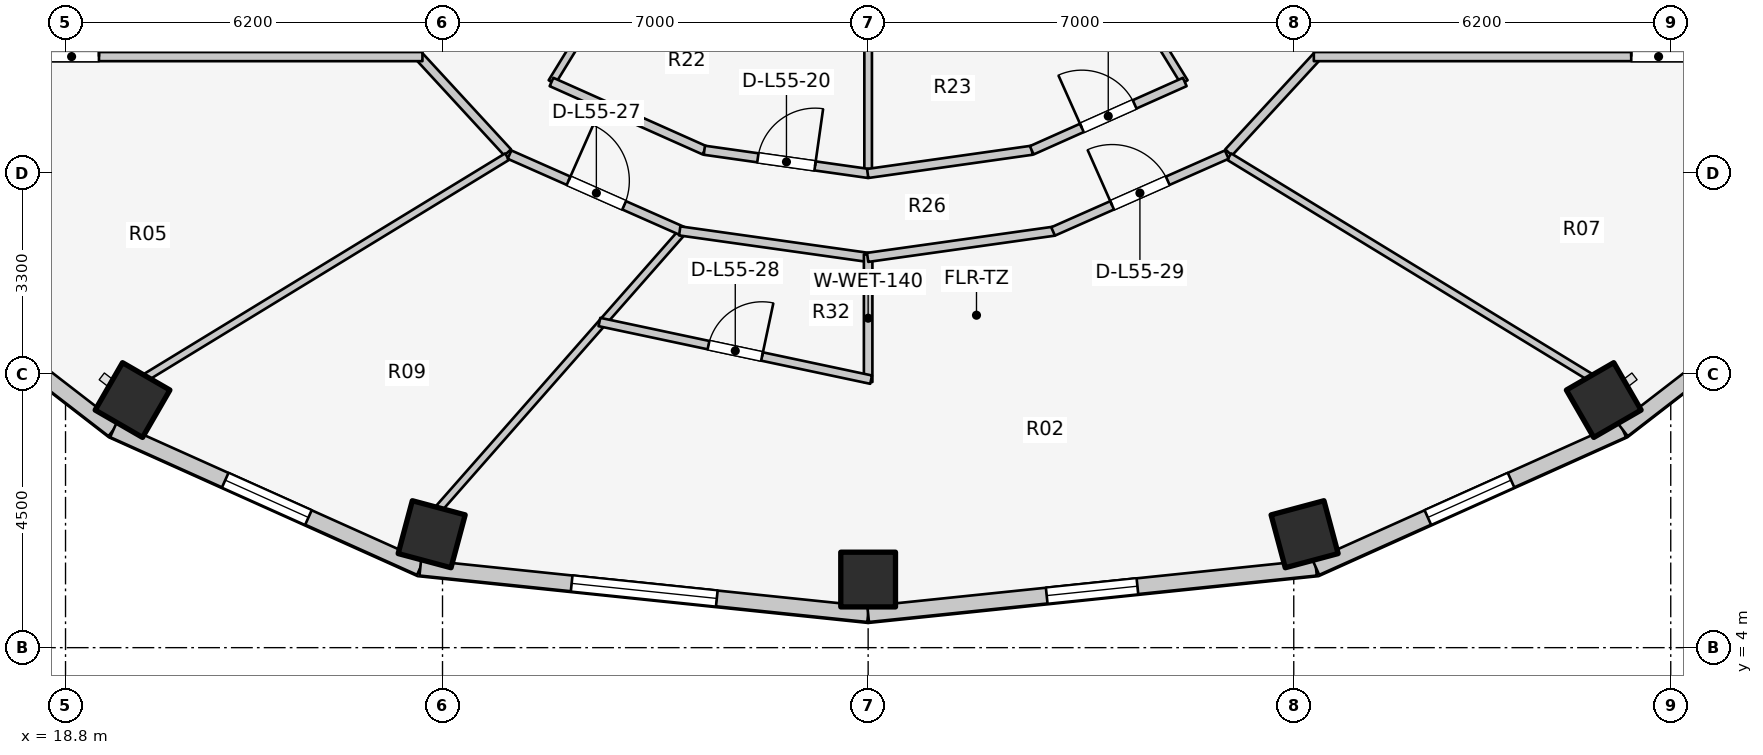
"""IFC4 building model, lengths in metres.
Left out: names, types, materials, properties, quantities, classifications, styles, units other than length and angle.
Written with IfcOpenShell. Run it as: python <this file> out.ifc"""

import sys

from ifc_helpers import new_model, si_unit, direction, frame, frame_2d, origin, origin_2d, place, context, subcontext, project, spatial, rectangle, extrude, element, fill, save


model = new_model("IFC4")
c1 = context("Model", 3, precision=1e-05, world=origin(), true_north=direction((0.0, 1.0)))
c2 = subcontext(c1, "Body", "Model", "MODEL_VIEW")
j1 = project(units=[si_unit("LENGTHUNIT", "METRE"), si_unit("PLANEANGLEUNIT", "RADIAN")], contexts=[c1])
p1 = place(None, origin())
s1 = spatial("IfcSite", under=j1, at=p1, CompositionType="ELEMENT")
p2 = place(p1, origin())
s2 = spatial("IfcBuilding", under=s1, at=p2, CompositionType="ELEMENT")
p3 = place(p2, frame((0.0, 0.0, 180.8)))
s3 = spatial("IfcBuildingStorey", under=s2, at=p3, CompositionType="ELEMENT", Elevation=180.8)
for number, where, z_axis, x_axis in (
    (1, (19.902, 8.072, 0.0), (0.0, 0.0, 1.0), (-0.5, -0.866, 0.0)),
    (2, (24.822, 5.865, 0.0), (0.0, 0.0, 1.0), (-0.259, -0.966, 0.0)),
    (3, (32.0, 5.12, 0.0), (0.0, 0.0, 1.0), (0.0, -1.0, 0.0)),
    (4, (39.178, 5.865, 0.0), (0.0, 0.0, 1.0), (0.259, -0.966, 0.0)),
    (5, (44.098, 8.072, 0.0), (0.0, 0.0, 1.0), (0.5, -0.866, 0.0)),
):
    element("IfcColumn", number, at=place(p3, frame(where, z_axis=z_axis, x_axis=x_axis)), inside=s3, PredefinedType="COLUMN", context=c2, shape_type="SweptSolid", body=[
        extrude(rectangle(XDim=0.9, YDim=0.9, at=origin_2d()), origin(), (0.0, 0.0, 1.0), 3.1),
    ])
p4 = place(p3, frame((15.731, 10.559, 0.0), z_axis=(0.0, 0.0, 1.0), x_axis=(0.791460185804, -0.611220724687, 0.0)))
e6 = element("IfcWall", 6, at=p4, inside=s3, PredefinedType="STANDARD", context=c2, shape_type="SweptSolid", body=[
    extrude(rectangle(XDim=4.872, YDim=0.26, at=frame_2d((2.436, 0.0))), origin(), (0.0, 0.0, 1.0), 2.85),
])
p5 = place(p3, frame((19.587, 7.581, 0.0), z_axis=(0.0, 0.0, 1.0), x_axis=(0.912353637112, -0.409403029847, 0.0)))
e7 = element("IfcWall", 7, at=p5, inside=s3, PredefinedType="STANDARD", context=c2, shape_type="SweptSolid", body=[
    extrude(rectangle(XDim=5.533, YDim=0.26, at=frame_2d((2.766, 0.0))), origin(), (0.0, 0.0, 1.0), 2.85),
])
p6 = place(p5, frame((2.016, 0.0, 0.75)))
e8 = element("IfcOpeningElement", 8, at=p6, cuts=e7, PredefinedType="OPENING", context=c2, shape_type="SweptSolid", body=[
    extrude(rectangle(XDim=1.5, YDim=1.6, at=frame_2d((0.75, 0.8))), frame((0.0, 0.14, 0.0), z_axis=(0.0, -1.0, 0.0), x_axis=(1.0, 0.0, 0.0)), (0.0, 0.0, 1.0), 0.28),
])
p7 = place(p3, frame((24.635, 5.315, 0.0), z_axis=(0.0, 0.0, 1.0), x_axis=(0.994664178965, -0.10316574569, 0.0)))
e9 = element("IfcWall", 9, at=p7, inside=s3, PredefinedType="STANDARD", context=c2, shape_type="SweptSolid", body=[
    extrude(rectangle(XDim=7.405, YDim=0.26, at=frame_2d((3.702, 0.0))), origin(), (0.0, 0.0, 1.0), 2.85),
])
p8 = place(p7, frame((2.502, 0.0, 0.75)))
e10 = element("IfcOpeningElement", 10, at=p8, cuts=e9, PredefinedType="OPENING", context=c2, shape_type="SweptSolid", body=[
    extrude(rectangle(XDim=2.4, YDim=1.7, at=frame_2d((1.2, 0.85))), frame((0.0, 0.14, 0.0), z_axis=(0.0, -1.0, 0.0), x_axis=(1.0, 0.0, 0.0)), (0.0, 0.0, 1.0), 0.28),
])
p9 = place(p3, frame((32.0, 4.552, 0.0), z_axis=(0.0, 0.0, 1.0), x_axis=(0.994664178965, 0.10316574569, 0.0)))
e11 = element("IfcWall", 11, at=p9, inside=s3, PredefinedType="STANDARD", context=c2, shape_type="SweptSolid", body=[
    extrude(rectangle(XDim=7.405, YDim=0.26, at=frame_2d((3.702, 0.0))), origin(), (0.0, 0.0, 1.0), 2.85),
])
p10 = place(p9, frame((2.952, 0.0, 0.75)))
e12 = element("IfcOpeningElement", 12, at=p10, cuts=e11, PredefinedType="OPENING", context=c2, shape_type="SweptSolid", body=[
    extrude(rectangle(XDim=1.5, YDim=1.6, at=frame_2d((0.75, 0.8))), frame((0.0, 0.14, 0.0), z_axis=(0.0, -1.0, 0.0), x_axis=(1.0, 0.0, 0.0)), (0.0, 0.0, 1.0), 0.28),
])
p11 = place(p3, frame((39.365, 5.315, 0.0), z_axis=(0.0, 0.0, 1.0), x_axis=(0.912353637112, 0.409403029847, 0.0)))
e13 = element("IfcWall", 13, at=p11, inside=s3, PredefinedType="STANDARD", context=c2, shape_type="SweptSolid", body=[
    extrude(rectangle(XDim=5.533, YDim=0.26, at=frame_2d((2.766, 0.0))), origin(), (0.0, 0.0, 1.0), 2.85),
])
p12 = place(p11, frame((2.016, 0.0, 0.75)))
e14 = element("IfcOpeningElement", 14, at=p12, cuts=e13, PredefinedType="OPENING", context=c2, shape_type="SweptSolid", body=[
    extrude(rectangle(XDim=1.5, YDim=1.6, at=frame_2d((0.75, 0.8))), frame((0.0, 0.14, 0.0), z_axis=(0.0, -1.0, 0.0), x_axis=(1.0, 0.0, 0.0)), (0.0, 0.0, 1.0), 0.28),
])
p13 = place(p3, frame((44.413, 7.581, 0.0), z_axis=(0.0, 0.0, 1.0), x_axis=(0.791460185804, 0.611220724687, 0.0)))
e15 = element("IfcWall", 15, at=p13, inside=s3, PredefinedType="STANDARD", context=c2, shape_type="SweptSolid", body=[
    extrude(rectangle(XDim=4.872, YDim=0.26, at=frame_2d((2.436, 0.0))), origin(), (0.0, 0.0, 1.0), 2.85),
])
p14 = place(p3, frame((26.072, 12.144, 0.0), z_axis=(0.0, 0.0, 1.0), x_axis=(-0.677579737957, 0.735449317567, 0.0)))
e16 = element("IfcWall", 16, at=p14, inside=s3, PredefinedType="PARTITIONING", context=c2, shape_type="SweptSolid", body=[
    extrude(rectangle(XDim=2.173, YDim=0.15, at=frame_2d((1.086, 0.0))), origin(), (0.0, 0.0, 1.0), 2.299),
])
p15 = place(p3, frame((17.15, 13.72, 0.0), z_axis=(0.0, 0.0, 1.0), x_axis=(1.0, 0.0, 0.0)))
e17 = element("IfcWall", 17, at=p15, inside=s3, PredefinedType="PARTITIONING", context=c2, shape_type="SweptSolid", body=[
    extrude(rectangle(XDim=7.52, YDim=0.15, at=frame_2d((3.76, 0.0))), origin(), (0.0, 0.0, 1.0), 2.299),
])
p16 = place(p15, frame((1.3, 0.0, 0.0)))
e18 = element("IfcOpeningElement", 18, at=p16, cuts=e17, PredefinedType="OPENING", context=c2, shape_type="SweptSolid", body=[
    extrude(rectangle(XDim=0.9, YDim=2.1, at=frame_2d((0.45, 1.05))), frame((0.0, 0.085, 0.0), z_axis=(0.0, -1.0, 0.0), x_axis=(1.0, 0.0, 0.0)), (0.0, 0.0, 1.0), 0.17),
])
p17 = place(p3, frame((37.928, 12.144, 0.0), z_axis=(0.0, 0.0, 1.0), x_axis=(0.677579737957, 0.735449317567, 0.0)))
e19 = element("IfcWall", 19, at=p17, inside=s3, PredefinedType="PARTITIONING", context=c2, shape_type="SweptSolid", body=[
    extrude(rectangle(XDim=2.173, YDim=0.15, at=frame_2d((1.086, 0.0))), origin(), (0.0, 0.0, 1.0), 2.299),
])
p18 = place(p3, frame((39.33, 13.72, 0.0), z_axis=(0.0, 0.0, 1.0), x_axis=(1.0, 0.0, 0.0)))
e20 = element("IfcWall", 20, at=p18, inside=s3, PredefinedType="PARTITIONING", context=c2, shape_type="SweptSolid", body=[
    extrude(rectangle(XDim=7.52, YDim=0.15, at=frame_2d((3.76, 0.0))), origin(), (0.0, 0.0, 1.0), 2.299),
])
p19 = place(p18, frame((5.22, 0.0, 0.0)))
e21 = element("IfcOpeningElement", 21, at=p19, cuts=e20, PredefinedType="OPENING", context=c2, shape_type="SweptSolid", body=[
    extrude(rectangle(XDim=0.9, YDim=2.1, at=frame_2d((0.45, 1.05))), frame((0.0, 0.085, 0.0), z_axis=(0.0, -1.0, 0.0), x_axis=(1.0, 0.0, 0.0)), (0.0, 0.0, 1.0), 0.17),
])
p20 = place(p3, frame((28.45, 15.985, 0.0), z_axis=(0.0, 0.0, 1.0), x_axis=(-0.523587550846, -0.851971875474, 0.0)))
e22 = element("IfcWall", 22, at=p20, inside=s3, PredefinedType="PARTITIONING", context=c2, shape_type="SweptSolid", body=[
    extrude(rectangle(XDim=3.153, YDim=0.125, at=frame_2d((1.577, 0.0))), origin(), (0.0, 0.0, 1.0), 2.299),
])
p21 = place(p3, frame((32.0, 14.9, 0.0), z_axis=(0.0, 0.0, 1.0), x_axis=(0.0, -1.0, 0.0)))
e23 = element("IfcWall", 23, at=p21, inside=s3, PredefinedType="PARTITIONING", context=c2, shape_type="SweptSolid", body=[
    extrude(rectangle(XDim=3.102, YDim=0.125, at=frame_2d((1.551, 0.0))), origin(), (0.0, 0.0, 1.0), 2.299),
])
p22 = place(p3, frame((35.55, 15.985, 0.0), z_axis=(0.0, 0.0, 1.0), x_axis=(0.523587550846, -0.851971875474, 0.0)))
e24 = element("IfcWall", 24, at=p22, inside=s3, PredefinedType="PARTITIONING", context=c2, shape_type="SweptSolid", body=[
    extrude(rectangle(XDim=3.153, YDim=0.125, at=frame_2d((1.577, 0.0))), origin(), (0.0, 0.0, 1.0), 2.299),
])
p23 = place(p3, frame((26.793, 13.303, 0.0), z_axis=(0.0, 0.0, 1.0), x_axis=(0.913145536541, -0.407633694749, 0.0)))
e25 = element("IfcWall", 25, at=p23, inside=s3, PredefinedType="PARTITIONING", context=c2, shape_type="SweptSolid", body=[
    extrude(rectangle(XDim=2.756, YDim=0.15, at=frame_2d((1.378, 0.0))), origin(), (0.0, 0.0, 1.0), 2.299),
])
p24 = place(p3, frame((29.306, 12.18, 0.0), z_axis=(0.0, 0.0, 1.0), x_axis=(0.990145400278, -0.140043158738, 0.0)))
e26 = element("IfcWall", 26, at=p24, inside=s3, PredefinedType="PARTITIONING", context=c2, shape_type="SweptSolid", body=[
    extrude(rectangle(XDim=2.728, YDim=0.15, at=frame_2d((1.364, 0.0))), origin(), (0.0, 0.0, 1.0), 2.299),
])
p25 = place(p24, frame((0.889, 0.0, 0.0)))
e27 = element("IfcOpeningElement", 27, at=p25, cuts=e26, PredefinedType="OPENING", context=c2, shape_type="SweptSolid", body=[
    extrude(rectangle(XDim=0.95, YDim=2.1, at=frame_2d((0.475, 1.05))), frame((0.0, 0.085, 0.0), z_axis=(0.0, -1.0, 0.0), x_axis=(1.0, 0.0, 0.0)), (0.0, 0.0, 1.0), 0.17),
])
p26 = place(p3, frame((31.993, 11.798, 0.0), z_axis=(0.0, 0.0, 1.0), x_axis=(0.990145400278, 0.140043158738, 0.0)))
e28 = element("IfcWall", 28, at=p26, inside=s3, PredefinedType="PARTITIONING", context=c2, shape_type="SweptSolid", body=[
    extrude(rectangle(XDim=2.728, YDim=0.15, at=frame_2d((1.364, 0.0))), origin(), (0.0, 0.0, 1.0), 2.299),
])
p27 = place(p3, frame((34.69, 12.179, 0.0), z_axis=(0.0, 0.0, 1.0), x_axis=(0.913145536541, 0.407633694749, 0.0)))
e29 = element("IfcWall", 29, at=p27, inside=s3, PredefinedType="PARTITIONING", context=c2, shape_type="SweptSolid", body=[
    extrude(rectangle(XDim=2.756, YDim=0.15, at=frame_2d((1.378, 0.0))), origin(), (0.0, 0.0, 1.0), 2.299),
])
p28 = place(p27, frame((0.903, 0.0, 0.0)))
e30 = element("IfcOpeningElement", 30, at=p28, cuts=e29, PredefinedType="OPENING", context=c2, shape_type="SweptSolid", body=[
    extrude(rectangle(XDim=0.95, YDim=2.1, at=frame_2d((0.475, 1.05))), frame((0.0, 0.085, 0.0), z_axis=(0.0, -1.0, 0.0), x_axis=(1.0, 0.0, 0.0)), (0.0, 0.0, 1.0), 0.17),
])
p29 = place(p3, frame((26.062, 12.075, 0.0), z_axis=(0.0, 0.0, 1.0), x_axis=(-0.853440334679, -0.521190555501, 0.0)))
e31 = element("IfcWall", 31, at=p29, inside=s3, PredefinedType="PARTITIONING", context=c2, shape_type="SweptSolid", body=[
    extrude(rectangle(XDim=6.966, YDim=0.125, at=frame_2d((3.483, 0.0))), origin(), (0.0, 0.0, 1.0), 2.299),
])
p30 = place(p3, frame((28.914, 10.805, 0.0), z_axis=(0.0, 0.0, 1.0), x_axis=(-0.660581320981, -0.750754499401, 0.0)))
e32 = element("IfcWall", 32, at=p30, inside=s3, PredefinedType="PARTITIONING", context=c2, shape_type="SweptSolid", body=[
    extrude(rectangle(XDim=6.027, YDim=0.125, at=frame_2d((3.013, 0.0))), origin(), (0.0, 0.0, 1.0), 2.299),
])
p31 = place(p3, frame((37.938, 12.075, 0.0), z_axis=(0.0, 0.0, 1.0), x_axis=(0.853440334679, -0.521190555501, 0.0)))
e33 = element("IfcWall", 33, at=p31, inside=s3, PredefinedType="PARTITIONING", context=c2, shape_type="SweptSolid", body=[
    extrude(rectangle(XDim=6.966, YDim=0.125, at=frame_2d((3.483, 0.0))), origin(), (0.0, 0.0, 1.0), 2.299),
])
p32 = place(p3, frame((26.102, 12.108, 0.0), z_axis=(0.0, 0.0, 1.0), x_axis=(0.914519212393, -0.40454247016, 0.0)))
e34 = element("IfcWall", 34, at=p32, inside=s3, PredefinedType="PARTITIONING", context=c2, shape_type="SweptSolid", body=[
    extrude(rectangle(XDim=3.124, YDim=0.15, at=frame_2d((1.562, 0.0))), origin(), (0.0, 0.0, 1.0), 2.299),
])
p33 = place(p32, frame((1.062, 0.0, 0.0)))
e35 = element("IfcOpeningElement", 35, at=p33, cuts=e34, PredefinedType="OPENING", context=c2, shape_type="SweptSolid", body=[
    extrude(rectangle(XDim=1.0, YDim=2.1, at=frame_2d((0.5, 1.05))), frame((0.0, 0.085, 0.0), z_axis=(0.0, -1.0, 0.0), x_axis=(1.0, 0.0, 0.0)), (0.0, 0.0, 1.0), 0.17),
])
p34 = place(p3, frame((28.901, 10.854, 0.0), z_axis=(0.0, 0.0, 1.0), x_axis=(0.990251283702, -0.139292480508, 0.0)))
e36 = element("IfcWall", 36, at=p34, inside=s3, PredefinedType="PARTITIONING", context=c2, shape_type="SweptSolid", body=[
    extrude(rectangle(XDim=3.179, YDim=0.15, at=frame_2d((1.59, 0.0))), origin(), (0.0, 0.0, 1.0), 2.299),
])
p35 = place(p3, frame((32.0, 10.468, 0.0), z_axis=(0.0, 0.0, 1.0), x_axis=(0.0, -1.0, 0.0)))
e37 = element("IfcWall", 37, at=p35, inside=s3, PredefinedType="PLUMBINGWALL", context=c2, shape_type="SweptSolid", body=[
    extrude(rectangle(XDim=2.1, YDim=0.14, at=frame_2d((1.05, 0.0))), origin(), (0.0, 0.0, 1.0), 2.299),
])
p36 = place(p3, frame((27.581, 9.356, 0.0), z_axis=(0.0, 0.0, 1.0), x_axis=(0.978225905005, -0.20754295646, 0.0)))
e38 = element("IfcWall", 38, at=p36, inside=s3, PredefinedType="PLUMBINGWALL", context=c2, shape_type="SweptSolid", body=[
    extrude(rectangle(XDim=4.568, YDim=0.14, at=frame_2d((2.284, 0.0))), origin(), (0.0, 0.0, 1.0), 2.299),
])
p37 = place(p36, frame((1.834, 0.0, 0.0)))
e39 = element("IfcOpeningElement", 39, at=p37, cuts=e38, PredefinedType="OPENING", context=c2, shape_type="SweptSolid", body=[
    extrude(rectangle(XDim=0.9, YDim=2.1, at=frame_2d((0.45, 1.05))), frame((0.0, 0.08, 0.0), z_axis=(0.0, -1.0, 0.0), x_axis=(1.0, 0.0, 0.0)), (0.0, 0.0, 1.0), 0.16),
])
p38 = place(p3, frame((31.992, 10.418, 0.0), z_axis=(0.0, 0.0, 1.0), x_axis=(0.990254709652, 0.13926812274, 0.0)))
e40 = element("IfcWall", 40, at=p38, inside=s3, PredefinedType="PARTITIONING", context=c2, shape_type="SweptSolid", body=[
    extrude(rectangle(XDim=3.096, YDim=0.15, at=frame_2d((1.548, 0.0))), origin(), (0.0, 0.0, 1.0), 2.299),
])
p39 = place(p3, frame((35.042, 10.844, 0.0), z_axis=(0.0, 0.0, 1.0), x_axis=(0.914519212393, 0.40454247016, 0.0)))
e41 = element("IfcWall", 41, at=p39, inside=s3, PredefinedType="PARTITIONING", context=c2, shape_type="SweptSolid", body=[
    extrude(rectangle(XDim=3.124, YDim=0.15, at=frame_2d((1.562, 0.0))), origin(), (0.0, 0.0, 1.0), 2.299),
])
p40 = place(p39, frame((1.062, 0.0, 0.0)))
e42 = element("IfcOpeningElement", 42, at=p40, cuts=e41, PredefinedType="OPENING", context=c2, shape_type="SweptSolid", body=[
    extrude(rectangle(XDim=1.0, YDim=2.1, at=frame_2d((0.5, 1.05))), frame((0.0, 0.085, 0.0), z_axis=(0.0, -1.0, 0.0), x_axis=(1.0, 0.0, 0.0)), (0.0, 0.0, 1.0), 0.17),
])
p41 = place(p6, origin())
e43 = element("IfcWindow", 43, at=p41, inside=s3, PartitioningType="SINGLE_PANEL", PredefinedType="WINDOW", context=c2, shape_type="SweptSolid", body=[
    extrude(rectangle(XDim=1.5, YDim=1.6, at=frame_2d((0.75, 0.8))), frame((0.0, 0.03, 0.0), z_axis=(0.0, -1.0, 0.0), x_axis=(1.0, 0.0, 0.0)), (0.0, 0.0, 1.0), 0.06),
])
fill(e8, e43)
p42 = place(p8, origin())
e44 = element("IfcWindow", 44, at=p42, inside=s3, PartitioningType="SINGLE_PANEL", PredefinedType="WINDOW", context=c2, shape_type="SweptSolid", body=[
    extrude(rectangle(XDim=2.4, YDim=1.7, at=frame_2d((1.2, 0.85))), frame((0.0, 0.03, 0.0), z_axis=(0.0, -1.0, 0.0), x_axis=(1.0, 0.0, 0.0)), (0.0, 0.0, 1.0), 0.06),
])
fill(e10, e44)
p43 = place(p10, origin())
e45 = element("IfcWindow", 45, at=p43, inside=s3, PartitioningType="SINGLE_PANEL", PredefinedType="WINDOW", context=c2, shape_type="SweptSolid", body=[
    extrude(rectangle(XDim=1.5, YDim=1.6, at=frame_2d((0.75, 0.8))), frame((0.0, 0.03, 0.0), z_axis=(0.0, -1.0, 0.0), x_axis=(1.0, 0.0, 0.0)), (0.0, 0.0, 1.0), 0.06),
])
fill(e12, e45)
p44 = place(p12, origin())
e46 = element("IfcWindow", 46, at=p44, inside=s3, PartitioningType="SINGLE_PANEL", PredefinedType="WINDOW", context=c2, shape_type="SweptSolid", body=[
    extrude(rectangle(XDim=1.5, YDim=1.6, at=frame_2d((0.75, 0.8))), frame((0.0, 0.03, 0.0), z_axis=(0.0, -1.0, 0.0), x_axis=(1.0, 0.0, 0.0)), (0.0, 0.0, 1.0), 0.06),
])
fill(e14, e46)
p45 = place(p16, origin())
e47 = element("IfcDoor", 47, at=p45, inside=s3, OperationType="SINGLE_SWING_RIGHT", PredefinedType="DOOR", context=c2, shape_type="SweptSolid", body=[
    extrude(rectangle(XDim=0.9, YDim=2.1, at=frame_2d((0.45, 1.05))), frame((0.0, 0.025, 0.0), z_axis=(0.0, -1.0, 0.0), x_axis=(1.0, 0.0, 0.0)), (0.0, 0.0, 1.0), 0.05),
])
fill(e18, e47)
p46 = place(p19, origin())
e48 = element("IfcDoor", 48, at=p46, inside=s3, OperationType="SINGLE_SWING_LEFT", PredefinedType="DOOR", context=c2, shape_type="SweptSolid", body=[
    extrude(rectangle(XDim=0.9, YDim=2.1, at=frame_2d((0.45, 1.05))), frame((0.0, 0.025, 0.0), z_axis=(0.0, -1.0, 0.0), x_axis=(1.0, 0.0, 0.0)), (0.0, 0.0, 1.0), 0.05),
])
fill(e21, e48)
p47 = place(p25, origin())
e49 = element("IfcDoor", 49, at=p47, inside=s3, OperationType="SINGLE_SWING_RIGHT", PredefinedType="DOOR", context=c2, shape_type="SweptSolid", body=[
    extrude(rectangle(XDim=0.95, YDim=2.1, at=frame_2d((0.475, 1.05))), frame((0.0, 0.025, 0.0), z_axis=(0.0, -1.0, 0.0), x_axis=(1.0, 0.0, 0.0)), (0.0, 0.0, 1.0), 0.05),
])
fill(e27, e49)
p48 = place(p28, origin())
e50 = element("IfcDoor", 50, at=p48, inside=s3, OperationType="SINGLE_SWING_LEFT", PredefinedType="DOOR", context=c2, shape_type="SweptSolid", body=[
    extrude(rectangle(XDim=0.95, YDim=2.1, at=frame_2d((0.475, 1.05))), frame((0.0, 0.025, 0.0), z_axis=(0.0, -1.0, 0.0), x_axis=(1.0, 0.0, 0.0)), (0.0, 0.0, 1.0), 0.05),
])
fill(e30, e50)
p49 = place(p33, origin())
e51 = element("IfcDoor", 51, at=p49, inside=s3, OperationType="SINGLE_SWING_LEFT", PredefinedType="DOOR", context=c2, shape_type="SweptSolid", body=[
    extrude(rectangle(XDim=1.0, YDim=2.1, at=frame_2d((0.5, 1.05))), frame((0.0, 0.025, 0.0), z_axis=(0.0, -1.0, 0.0), x_axis=(1.0, 0.0, 0.0)), (0.0, 0.0, 1.0), 0.05),
])
fill(e35, e51)
p50 = place(p37, origin())
e52 = element("IfcDoor", 52, at=p50, inside=s3, OperationType="SINGLE_SWING_RIGHT", PredefinedType="DOOR", context=c2, shape_type="SweptSolid", body=[
    extrude(rectangle(XDim=0.9, YDim=2.1, at=frame_2d((0.45, 1.05))), frame((0.0, 0.025, 0.0), z_axis=(0.0, -1.0, 0.0), x_axis=(1.0, 0.0, 0.0)), (0.0, 0.0, 1.0), 0.05),
])
fill(e39, e52)
p51 = place(p40, origin())
e53 = element("IfcDoor", 53, at=p51, inside=s3, OperationType="SINGLE_SWING_LEFT", PredefinedType="DOOR", context=c2, shape_type="SweptSolid", body=[
    extrude(rectangle(XDim=1.0, YDim=2.1, at=frame_2d((0.5, 1.05))), frame((0.0, 0.025, 0.0), z_axis=(0.0, -1.0, 0.0), x_axis=(1.0, 0.0, 0.0)), (0.0, 0.0, 1.0), 0.05),
])
fill(e42, e53)
save(model, sys.argv[1])
